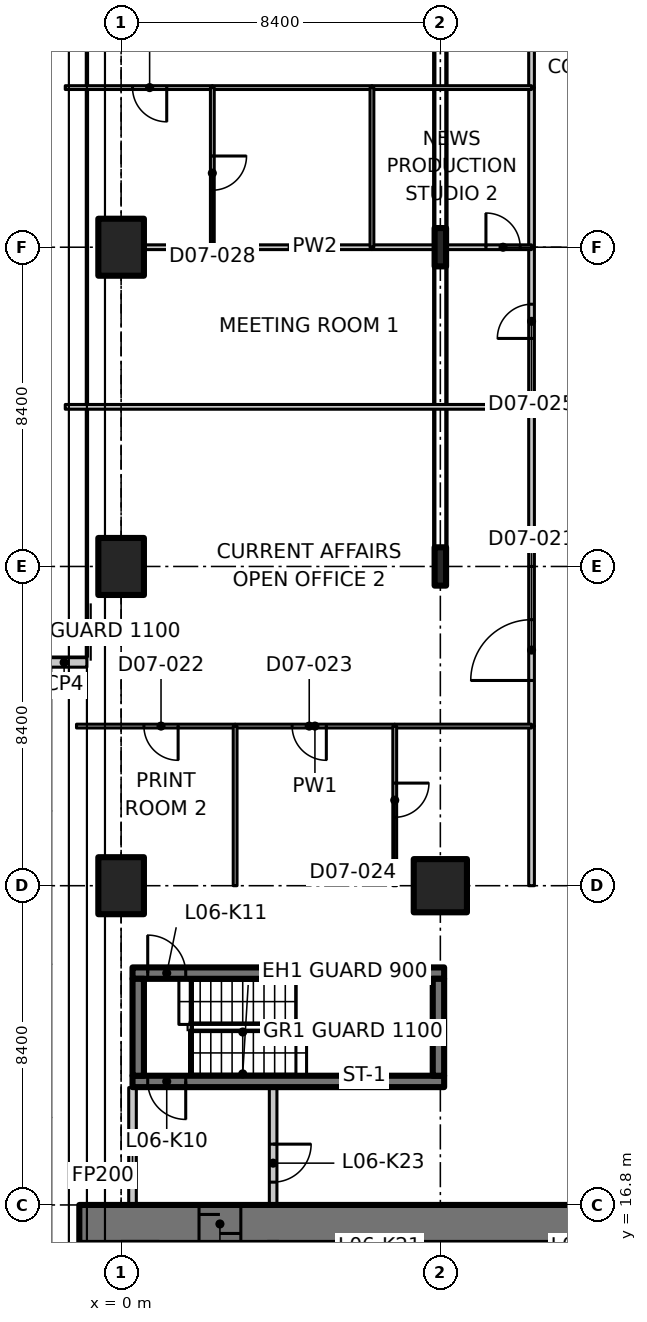
"""IFC4 building model, lengths in metres.
Left out: names, types, materials, properties, quantities, classifications, styles, units other than length and angle.
Written with IfcOpenShell. Run it as: python <this file> out.ifc"""

import sys

from ifc_helpers import new_model, si_unit, direction, frame, frame_2d, origin, origin_2d, place, context, subcontext, project, spatial, polyline, rectangle, i_section, outline, extrude, element, fill, save


model = new_model("IFC4")
c1 = context("Model", 3, precision=1e-05, world=origin(), true_north=direction((0.0, 1.0)))
c2 = subcontext(c1, "Body", "Model", "MODEL_VIEW")
j1 = project(units=[si_unit("LENGTHUNIT", "METRE"), si_unit("PLANEANGLEUNIT", "RADIAN")], contexts=[c1])
p1 = place(None, origin())
s1 = spatial("IfcSite", under=j1, at=p1, CompositionType="ELEMENT")
p2 = place(p1, origin())
s2 = spatial("IfcBuilding", under=s1, at=p2, CompositionType="ELEMENT")
p3 = place(p2, frame((0.0, 0.0, 36.5)))
s3 = spatial("IfcBuildingStorey", under=s2, at=p3, CompositionType="ELEMENT", Elevation=36.5)
for number, where, z_axis, x_axis in (
    (1, (0.0, 25.2, 0.0), (0.0, 0.0, 1.0), (1.0, 0.0, 0.0)),
    (2, (0.0, 33.6, 0.0), (0.0, 0.0, 1.0), (1.0, 0.0, 0.0)),
    (3, (0.0, 42.0, 0.0), (0.0, 0.0, 1.0), (1.0, 0.0, 0.0)),
):
    element("IfcColumn", number, at=place(p3, frame(where, z_axis=z_axis, x_axis=x_axis)), inside=s3, PredefinedType="COLUMN", context=c2, shape_type="SweptSolid", body=[
        extrude(rectangle(XDim=1.2, YDim=1.5, at=origin_2d()), origin(), (0.0, 0.0, 1.0), 3.35),
    ])
p4 = place(p3, frame((8.4, 25.2, 0.0), z_axis=(0.0, 0.0, 1.0), x_axis=(1.0, 0.0, 0.0)))
e4 = element("IfcColumn", 4, at=p4, inside=s3, PredefinedType="COLUMN", context=c2, shape_type="SweptSolid", body=[
    extrude(rectangle(XDim=1.4, YDim=1.4, at=origin_2d()), origin(), (0.0, 0.0, 1.0), 3.35),
])
for number, where, z_axis, x_axis in (
    (5, (8.4, 33.6, -0.25), (0.0, 0.0, 1.0), (1.0, 0.0, 0.0)),
    (6, (8.4, 42.0, -0.25), (0.0, 0.0, 1.0), (1.0, 0.0, 0.0)),
):
    element("IfcColumn", number, at=place(p3, frame(where, z_axis=z_axis, x_axis=x_axis)), inside=s3, PredefinedType="COLUMN", context=c2, shape_type="SweptSolid", body=[
        extrude(i_section(OverallWidth=0.302, OverallDepth=1.008, WebThickness=0.021, FlangeThickness=0.04, FilletRadius=0.03, at=origin_2d()), origin(), (0.0, 0.0, 1.0), 3.725),
    ])
p5 = place(p3, frame((-2.1, 31.075, 0.0), z_axis=(0.0, 0.0, 1.0), x_axis=(1.0, 0.0, 0.0)))
e7 = element("IfcWall", 7, at=p5, inside=s3, PredefinedType="PARAPET", context=c2, shape_type="SweptSolid", body=[
    extrude(rectangle(XDim=1.2, YDim=0.25, at=frame_2d((0.6, 0.0))), origin(), (0.0, 0.0, 1.0), 1.1),
])
p6 = place(p3, frame((-1.1, 16.3, 0.0), z_axis=(0.0, 0.0, 1.0), x_axis=(1.0, 0.0, 0.0)))
e8 = element("IfcWall", 8, at=p6, inside=s3, PredefinedType="SHEAR", context=c2, shape_type="SweptSolid", body=[
    extrude(rectangle(XDim=22.1, YDim=1.0, at=frame_2d((11.05, 0.0))), origin(), (0.0, 0.0, 1.0), 3.35),
])
p7 = place(p6, frame((3.15, 0.0, 0.0)))
e9 = element("IfcOpeningElement", 9, at=p7, cuts=e8, PredefinedType="OPENING", context=c2, shape_type="SweptSolid", body=[
    extrude(rectangle(XDim=1.1, YDim=2.3, at=frame_2d((0.55, 1.15))), frame((0.0, 0.51, 0.0), z_axis=(0.0, -1.0, 0.0), x_axis=(1.0, 0.0, 0.0)), (0.0, 0.0, 1.0), 1.02),
])
p8 = place(p3, frame((8.5, 20.05, 0.0), z_axis=(0.0, 0.0, 1.0), x_axis=(-1.0, 0.0, 0.0)))
e10 = element("IfcWall", 10, at=p8, inside=s3, PredefinedType="SHEAR", context=c2, shape_type="SweptSolid", body=[
    extrude(rectangle(XDim=8.2, YDim=0.3, at=frame_2d((4.1, 0.0))), origin(), (0.0, 0.0, 1.0), 3.35),
])
p9 = place(p8, frame((6.8, 0.0, 0.0)))
e11 = element("IfcOpeningElement", 11, at=p9, cuts=e10, PredefinedType="OPENING", context=c2, shape_type="SweptSolid", body=[
    extrude(rectangle(XDim=1.0, YDim=2.1, at=frame_2d((0.5, 1.05))), frame((0.0, 0.16, 0.0), z_axis=(0.0, -1.0, 0.0), x_axis=(1.0, 0.0, 0.0)), (0.0, 0.0, 1.0), 0.32),
])
p10 = place(p3, frame((0.3, 22.9, 0.0), z_axis=(0.0, 0.0, 1.0), x_axis=(1.0, 0.0, 0.0)))
e12 = element("IfcWall", 12, at=p10, inside=s3, PredefinedType="SHEAR", context=c2, shape_type="SweptSolid", body=[
    extrude(rectangle(XDim=8.2, YDim=0.3, at=frame_2d((4.1, 0.0))), origin(), (0.0, 0.0, 1.0), 3.35),
])
p11 = place(p10, frame((0.4, 0.0, 0.0)))
e13 = element("IfcOpeningElement", 13, at=p11, cuts=e12, PredefinedType="OPENING", context=c2, shape_type="SweptSolid", body=[
    extrude(rectangle(XDim=1.0, YDim=2.1, at=frame_2d((0.5, 1.05))), frame((0.0, 0.16, 0.0), z_axis=(0.0, -1.0, 0.0), x_axis=(1.0, 0.0, 0.0)), (0.0, 0.0, 1.0), 0.32),
])
for number, where, z_axis, x_axis in (
    (14, (0.45, 20.2, 0.0), (0.0, 0.0, 1.0), (0.0, 1.0, 0.0)),
    (15, (8.35, 20.2, 0.0), (0.0, 0.0, 1.0), (0.0, 1.0, 0.0)),
):
    element("IfcWall", number, at=place(p3, frame(where, z_axis=z_axis, x_axis=x_axis)), inside=s3, PredefinedType="SHEAR", context=c2, shape_type="SweptSolid", body=[
        extrude(rectangle(XDim=2.55, YDim=0.3, at=frame_2d((1.275, 0.0))), origin(), (0.0, 0.0, 1.0), 3.35),
    ])
p12 = place(p3, frame((0.3, 16.812, 0.0), z_axis=(0.0, 0.0, 1.0), x_axis=(0.0, 1.0, 0.0)))
e16 = element("IfcWall", 16, at=p12, inside=s3, PredefinedType="PARTITIONING", context=c2, shape_type="SweptSolid", body=[
    extrude(rectangle(XDim=3.076, YDim=0.2, at=frame_2d((1.538, 0.0))), origin(), (0.0, 0.0, 1.0), 2.98),
])
p13 = place(p3, frame((4.0, 19.888, 0.0), z_axis=(0.0, 0.0, 1.0), x_axis=(0.0, -1.0, 0.0)))
e17 = element("IfcWall", 17, at=p13, inside=s3, PredefinedType="PARTITIONING", context=c2, shape_type="SweptSolid", body=[
    extrude(rectangle(XDim=3.076, YDim=0.2, at=frame_2d((1.538, 0.0))), origin(), (0.0, 0.0, 1.0), 3.35),
])
p14 = place(p13, frame((1.488, 0.0, 0.0)))
e18 = element("IfcOpeningElement", 18, at=p14, cuts=e17, PredefinedType="OPENING", context=c2, shape_type="SweptSolid", body=[
    extrude(rectangle(XDim=1.0, YDim=2.1, at=frame_2d((0.5, 1.05))), frame((0.0, 0.11, 0.0), z_axis=(0.0, -1.0, 0.0), x_axis=(1.0, 0.0, 0.0)), (0.0, 0.0, 1.0), 0.22),
])
p15 = place(p3, frame((10.8, 29.4, 0.0), z_axis=(0.0, 0.0, 1.0), x_axis=(0.0, 1.0, 0.0)))
e19 = element("IfcWall", 19, at=p15, inside=s3, PredefinedType="PARTITIONING", context=c2, shape_type="SweptSolid", body=[
    extrude(rectangle(XDim=4.2, YDim=0.15, at=frame_2d((2.1, 0.0))), origin(), (0.0, 0.0, 1.0), 3.33),
])
p16 = place(p15, frame((1.2, 0.0, 0.0)))
e20 = element("IfcOpeningElement", 20, at=p16, cuts=e19, PredefinedType="OPENING", context=c2, shape_type="SweptSolid", body=[
    extrude(rectangle(XDim=1.6, YDim=2.1, at=frame_2d((0.8, 1.05))), frame((0.0, 0.085, 0.0), z_axis=(0.0, -1.0, 0.0), x_axis=(1.0, 0.0, 0.0)), (0.0, 0.0, 1.0), 0.17),
])
for number, where, z_axis, x_axis in (
    (21, (10.8, 25.2, 0.0), (0.0, 0.0, 1.0), (0.0, 1.0, 0.0)),
    (22, (10.8, 33.6, 0.0), (0.0, 0.0, 1.0), (0.0, 1.0, 0.0)),
):
    element("IfcWall", number, at=place(p3, frame(where, z_axis=z_axis, x_axis=x_axis)), inside=s3, PredefinedType="PARTITIONING", context=c2, shape_type="SweptSolid", body=[
        extrude(rectangle(XDim=4.2, YDim=0.15, at=frame_2d((2.1, 0.0))), origin(), (0.0, 0.0, 1.0), 3.33),
    ])
p17 = place(p3, frame((10.8, 37.8, 0.0), z_axis=(0.0, 0.0, 1.0), x_axis=(0.0, 1.0, 0.0)))
e23 = element("IfcWall", 23, at=p17, inside=s3, PredefinedType="PARTITIONING", context=c2, shape_type="SweptSolid", body=[
    extrude(rectangle(XDim=4.2, YDim=0.15, at=frame_2d((2.1, 0.0))), origin(), (0.0, 0.0, 1.0), 3.33),
])
p18 = place(p17, frame((1.8, 0.0, 0.0)))
e24 = element("IfcOpeningElement", 24, at=p18, cuts=e23, PredefinedType="OPENING", context=c2, shape_type="SweptSolid", body=[
    extrude(rectangle(XDim=0.9, YDim=2.1, at=frame_2d((0.45, 1.05))), frame((0.0, 0.085, 0.0), z_axis=(0.0, -1.0, 0.0), x_axis=(1.0, 0.0, 0.0)), (0.0, 0.0, 1.0), 0.17),
])
p19 = place(p3, frame((10.8, 46.2, 0.0), z_axis=(0.0, 0.0, 1.0), x_axis=(0.0, 1.0, 0.0)))
e25 = element("IfcWall", 25, at=p19, inside=s3, PredefinedType="PARTITIONING", context=c2, shape_type="SweptSolid", body=[
    extrude(rectangle(XDim=8.4, YDim=0.15, at=frame_2d((4.2, 0.0))), origin(), (0.0, 0.0, 1.0), 3.33),
])
p20 = place(p19, frame((3.6, 0.0, 0.0)))
e26 = element("IfcOpeningElement", 26, at=p20, cuts=e25, PredefinedType="OPENING", context=c2, shape_type="SweptSolid", body=[
    extrude(rectangle(XDim=1.6, YDim=2.1, at=frame_2d((0.8, 1.05))), frame((0.0, 0.085, 0.0), z_axis=(0.0, -1.0, 0.0), x_axis=(1.0, 0.0, 0.0)), (0.0, 0.0, 1.0), 0.17),
])
p21 = place(p3, frame((10.8, 42.0, 0.0), z_axis=(0.0, 0.0, 1.0), x_axis=(0.0, 1.0, 0.0)))
e27 = element("IfcWall", 27, at=p21, inside=s3, PredefinedType="PARTITIONING", context=c2, shape_type="SweptSolid", body=[
    extrude(rectangle(XDim=4.2, YDim=0.15, at=frame_2d((2.1, 0.0))), origin(), (0.0, 0.0, 1.0), 3.33),
])
p22 = place(p3, frame((3.0, 29.4, 0.0), z_axis=(0.0, 0.0, 1.0), x_axis=(-1.0, 0.0, 0.0)))
e28 = element("IfcWall", 28, at=p22, inside=s3, PredefinedType="PARTITIONING", context=c2, shape_type="SweptSolid", body=[
    extrude(rectangle(XDim=4.174, YDim=0.1, at=frame_2d((2.087, 0.0))), origin(), (0.0, 0.0, 1.0), 2.98),
])
p23 = place(p22, frame((1.5, 0.0, 0.0)))
e29 = element("IfcOpeningElement", 29, at=p23, cuts=e28, PredefinedType="OPENING", context=c2, shape_type="SweptSolid", body=[
    extrude(rectangle(XDim=0.9, YDim=2.1, at=frame_2d((0.45, 1.05))), frame((0.0, 0.06, 0.0), z_axis=(0.0, -1.0, 0.0), x_axis=(1.0, 0.0, 0.0)), (0.0, 0.0, 1.0), 0.12),
])
p24 = place(p3, frame((7.2, 29.4, 0.0), z_axis=(0.0, 0.0, 1.0), x_axis=(-1.0, 0.0, 0.0)))
e30 = element("IfcWall", 30, at=p24, inside=s3, PredefinedType="PARTITIONING", context=c2, shape_type="SweptSolid", body=[
    extrude(rectangle(XDim=4.2, YDim=0.1, at=frame_2d((2.1, 0.0))), origin(), (0.0, 0.0, 1.0), 3.33),
])
p25 = place(p24, frame((1.8, 0.0, 0.0)))
e31 = element("IfcOpeningElement", 31, at=p25, cuts=e30, PredefinedType="OPENING", context=c2, shape_type="SweptSolid", body=[
    extrude(rectangle(XDim=0.9, YDim=2.1, at=frame_2d((0.45, 1.05))), frame((0.0, 0.06, 0.0), z_axis=(0.0, -1.0, 0.0), x_axis=(1.0, 0.0, 0.0)), (0.0, 0.0, 1.0), 0.12),
])
p26 = place(p3, frame((10.8, 29.4, 0.0), z_axis=(0.0, 0.0, 1.0), x_axis=(-1.0, 0.0, 0.0)))
e32 = element("IfcWall", 32, at=p26, inside=s3, PredefinedType="PARTITIONING", context=c2, shape_type="SweptSolid", body=[
    extrude(rectangle(XDim=3.6, YDim=0.1, at=frame_2d((1.8, 0.0))), origin(), (0.0, 0.0, 1.0), 3.33),
])
p27 = place(p3, frame((-1.47, 37.8, 0.0), z_axis=(0.0, 0.0, 1.0), x_axis=(1.0, 0.0, 0.0)))
e33 = element("IfcWall", 33, at=p27, inside=s3, PredefinedType="PARTITIONING", context=c2, shape_type="SweptSolid", body=[
    extrude(outline(polyline([(0.0, 0.0), (12.27, 0.0), (12.27, 3.33), (1.92, 3.33), (1.918, 2.98), (1.022, 2.98), (1.02, 3.33), (0.37, 3.33), (0.0, 3.33), (0.0, 0.0)])), frame((0.0, 0.062, 0.0), z_axis=(0.0, -1.0, 0.0), x_axis=(1.0, 0.0, 0.0)), (0.0, 0.0, 1.0), 0.125),
])
p28 = place(p3, frame((3.0, 29.4, 0.0), z_axis=(0.0, 0.0, 1.0), x_axis=(0.0, -1.0, 0.0)))
e34 = element("IfcWall", 34, at=p28, inside=s3, PredefinedType="PARTITIONING", context=c2, shape_type="SweptSolid", body=[
    extrude(rectangle(XDim=4.2, YDim=0.1, at=frame_2d((2.1, 0.0))), origin(), (0.0, 0.0, 1.0), 3.33),
])
p29 = place(p3, frame((7.2, 29.4, 0.0), z_axis=(0.0, 0.0, 1.0), x_axis=(0.0, -1.0, 0.0)))
e35 = element("IfcWall", 35, at=p29, inside=s3, PredefinedType="PARTITIONING", context=c2, shape_type="SweptSolid", body=[
    extrude(rectangle(XDim=4.2, YDim=0.1, at=frame_2d((2.1, 0.0))), origin(), (0.0, 0.0, 1.0), 3.33),
])
p30 = place(p29, frame((1.5, 0.0, 0.0)))
e36 = element("IfcOpeningElement", 36, at=p30, cuts=e35, PredefinedType="OPENING", context=c2, shape_type="SweptSolid", body=[
    extrude(rectangle(XDim=0.9, YDim=2.1, at=frame_2d((0.45, 1.05))), frame((0.0, 0.06, 0.0), z_axis=(0.0, -1.0, 0.0), x_axis=(1.0, 0.0, 0.0)), (0.0, 0.0, 1.0), 0.12),
])
p31 = place(p3, frame((0.62, 42.0, 0.0), z_axis=(0.0, 0.0, 1.0), x_axis=(1.0, 0.0, 0.0)))
e37 = element("IfcWall", 37, at=p31, inside=s3, PredefinedType="PARTITIONING", context=c2, shape_type="SweptSolid", body=[
    extrude(rectangle(XDim=1.78, YDim=0.125, at=frame_2d((0.89, 0.0))), origin(), (0.0, 0.0, 1.0), 3.33),
])
p32 = place(p3, frame((2.4, 42.0, 0.0), z_axis=(0.0, 0.0, 1.0), x_axis=(1.0, 0.0, 0.0)))
e38 = element("IfcWall", 38, at=p32, inside=s3, PredefinedType="PARTITIONING", context=c2, shape_type="SweptSolid", body=[
    extrude(rectangle(XDim=4.2, YDim=0.125, at=frame_2d((2.1, 0.0))), origin(), (0.0, 0.0, 1.0), 3.33),
])
p33 = place(p3, frame((6.6, 42.0, 0.0), z_axis=(0.0, 0.0, 1.0), x_axis=(1.0, 0.0, 0.0)))
e39 = element("IfcWall", 39, at=p33, inside=s3, PredefinedType="PARTITIONING", context=c2, shape_type="SweptSolid", body=[
    extrude(rectangle(XDim=4.2, YDim=0.125, at=frame_2d((2.1, 0.0))), origin(), (0.0, 0.0, 1.0), 3.33),
])
p34 = place(p33, frame((3.0, 0.0, 0.0)))
e40 = element("IfcOpeningElement", 40, at=p34, cuts=e39, PredefinedType="OPENING", context=c2, shape_type="SweptSolid", body=[
    extrude(rectangle(XDim=0.9, YDim=2.1, at=frame_2d((0.45, 1.05))), frame((0.0, 0.073, 0.0), z_axis=(0.0, -1.0, 0.0), x_axis=(1.0, 0.0, 0.0)), (0.0, 0.0, 1.0), 0.145),
])
p35 = place(p3, frame((2.4, 46.2, 0.0), z_axis=(0.0, 0.0, 1.0), x_axis=(-1.0, 0.0, 0.0)))
e41 = element("IfcWall", 41, at=p35, inside=s3, PredefinedType="PARTITIONING", context=c2, shape_type="SweptSolid", body=[
    extrude(rectangle(XDim=3.87, YDim=0.1, at=frame_2d((1.935, 0.0))), origin(), (0.0, 0.0, 1.0), 2.98),
])
p36 = place(p35, frame((1.2, 0.0, 0.0)))
e42 = element("IfcOpeningElement", 42, at=p36, cuts=e41, PredefinedType="OPENING", context=c2, shape_type="SweptSolid", body=[
    extrude(rectangle(XDim=0.9, YDim=2.1, at=frame_2d((0.45, 1.05))), frame((0.0, 0.06, 0.0), z_axis=(0.0, -1.0, 0.0), x_axis=(1.0, 0.0, 0.0)), (0.0, 0.0, 1.0), 0.12),
])
p37 = place(p3, frame((6.6, 46.2, 0.0), z_axis=(0.0, 0.0, 1.0), x_axis=(-1.0, 0.0, 0.0)))
e43 = element("IfcWall", 43, at=p37, inside=s3, PredefinedType="PARTITIONING", context=c2, shape_type="SweptSolid", body=[
    extrude(rectangle(XDim=4.2, YDim=0.1, at=frame_2d((2.1, 0.0))), origin(), (0.0, 0.0, 1.0), 3.33),
])
p38 = place(p3, frame((10.8, 46.2, 0.0), z_axis=(0.0, 0.0, 1.0), x_axis=(-1.0, 0.0, 0.0)))
e44 = element("IfcWall", 44, at=p38, inside=s3, PredefinedType="PARTITIONING", context=c2, shape_type="SweptSolid", body=[
    extrude(rectangle(XDim=4.2, YDim=0.1, at=frame_2d((2.1, 0.0))), origin(), (0.0, 0.0, 1.0), 3.33),
])
p39 = place(p3, frame((2.4, 46.2, 0.0), z_axis=(0.0, 0.0, 1.0), x_axis=(0.0, -1.0, 0.0)))
e45 = element("IfcWall", 45, at=p39, inside=s3, PredefinedType="PARTITIONING", context=c2, shape_type="SweptSolid", body=[
    extrude(rectangle(XDim=4.2, YDim=0.1, at=frame_2d((2.1, 0.0))), origin(), (0.0, 0.0, 1.0), 3.33),
])
p40 = place(p39, frame((1.8, 0.0, 0.0)))
e46 = element("IfcOpeningElement", 46, at=p40, cuts=e45, PredefinedType="OPENING", context=c2, shape_type="SweptSolid", body=[
    extrude(rectangle(XDim=0.9, YDim=2.1, at=frame_2d((0.45, 1.05))), frame((0.0, 0.06, 0.0), z_axis=(0.0, -1.0, 0.0), x_axis=(1.0, 0.0, 0.0)), (0.0, 0.0, 1.0), 0.12),
])
p41 = place(p3, frame((6.6, 46.2, 0.0), z_axis=(0.0, 0.0, 1.0), x_axis=(0.0, -1.0, 0.0)))
e47 = element("IfcWall", 47, at=p41, inside=s3, PredefinedType="PARTITIONING", context=c2, shape_type="SweptSolid", body=[
    extrude(rectangle(XDim=4.2, YDim=0.1, at=frame_2d((2.1, 0.0))), origin(), (0.0, 0.0, 1.0), 3.33),
])
p42 = place(p7, origin())
e48 = element("IfcDoor", 48, at=p42, inside=s3, OperationType="SLIDING_TO_LEFT", PredefinedType="DOOR", context=c2, shape_type="SweptSolid", body=[
    extrude(rectangle(XDim=1.1, YDim=2.3, at=frame_2d((0.55, 1.15))), frame((0.0, 0.025, 0.0), z_axis=(0.0, -1.0, 0.0), x_axis=(1.0, 0.0, 0.0)), (0.0, 0.0, 1.0), 0.05),
])
fill(e9, e48)
p43 = place(p9, origin())
e49 = element("IfcDoor", 49, at=p43, inside=s3, OperationType="SINGLE_SWING_RIGHT", PredefinedType="DOOR", context=c2, shape_type="SweptSolid", body=[
    extrude(rectangle(XDim=1.0, YDim=2.1, at=frame_2d((0.5, 1.05))), frame((0.0, 0.025, 0.0), z_axis=(0.0, -1.0, 0.0), x_axis=(1.0, 0.0, 0.0)), (0.0, 0.0, 1.0), 0.05),
])
fill(e11, e49)
p44 = place(p11, origin())
e50 = element("IfcDoor", 50, at=p44, inside=s3, OperationType="SINGLE_SWING_LEFT", PredefinedType="DOOR", context=c2, shape_type="SweptSolid", body=[
    extrude(rectangle(XDim=1.0, YDim=2.1, at=frame_2d((0.5, 1.05))), frame((0.0, 0.025, 0.0), z_axis=(0.0, -1.0, 0.0), x_axis=(1.0, 0.0, 0.0)), (0.0, 0.0, 1.0), 0.05),
])
fill(e13, e50)
p45 = place(p14, origin())
e51 = element("IfcDoor", 51, at=p45, inside=s3, OperationType="SINGLE_SWING_LEFT", PredefinedType="DOOR", context=c2, shape_type="SweptSolid", body=[
    extrude(rectangle(XDim=1.0, YDim=2.1, at=frame_2d((0.5, 1.05))), frame((0.0, 0.025, 0.0), z_axis=(0.0, -1.0, 0.0), x_axis=(1.0, 0.0, 0.0)), (0.0, 0.0, 1.0), 0.05),
])
fill(e18, e51)
p46 = place(p16, origin())
e52 = element("IfcDoor", 52, at=p46, inside=s3, OperationType="DOUBLE_DOOR_SINGLE_SWING", PredefinedType="DOOR", context=c2, shape_type="SweptSolid", body=[
    extrude(rectangle(XDim=1.6, YDim=2.1, at=frame_2d((0.8, 1.05))), frame((0.0, 0.025, 0.0), z_axis=(0.0, -1.0, 0.0), x_axis=(1.0, 0.0, 0.0)), (0.0, 0.0, 1.0), 0.05),
])
fill(e20, e52)
p47 = place(p23, origin())
e53 = element("IfcDoor", 53, at=p47, inside=s3, OperationType="SINGLE_SWING_LEFT", PredefinedType="DOOR", context=c2, shape_type="SweptSolid", body=[
    extrude(rectangle(XDim=0.9, YDim=2.1, at=frame_2d((0.45, 1.05))), frame((0.0, 0.025, 0.0), z_axis=(0.0, -1.0, 0.0), x_axis=(1.0, 0.0, 0.0)), (0.0, 0.0, 1.0), 0.05),
])
fill(e29, e53)
p48 = place(p25, origin())
e54 = element("IfcDoor", 54, at=p48, inside=s3, OperationType="SINGLE_SWING_LEFT", PredefinedType="DOOR", context=c2, shape_type="SweptSolid", body=[
    extrude(rectangle(XDim=0.9, YDim=2.1, at=frame_2d((0.45, 1.05))), frame((0.0, 0.025, 0.0), z_axis=(0.0, -1.0, 0.0), x_axis=(1.0, 0.0, 0.0)), (0.0, 0.0, 1.0), 0.05),
])
fill(e31, e54)
p49 = place(p30, origin())
e55 = element("IfcDoor", 55, at=p49, inside=s3, OperationType="SINGLE_SWING_LEFT", PredefinedType="DOOR", context=c2, shape_type="SweptSolid", body=[
    extrude(rectangle(XDim=0.9, YDim=2.1, at=frame_2d((0.45, 1.05))), frame((0.0, 0.025, 0.0), z_axis=(0.0, -1.0, 0.0), x_axis=(1.0, 0.0, 0.0)), (0.0, 0.0, 1.0), 0.05),
])
fill(e36, e55)
p50 = place(p18, origin())
e56 = element("IfcDoor", 56, at=p50, inside=s3, OperationType="SINGLE_SWING_LEFT", PredefinedType="DOOR", context=c2, shape_type="SweptSolid", body=[
    extrude(rectangle(XDim=0.9, YDim=2.1, at=frame_2d((0.45, 1.05))), frame((0.0, 0.025, 0.0), z_axis=(0.0, -1.0, 0.0), x_axis=(1.0, 0.0, 0.0)), (0.0, 0.0, 1.0), 0.05),
])
fill(e24, e56)
p51 = place(p36, origin())
e57 = element("IfcDoor", 57, at=p51, inside=s3, OperationType="SINGLE_SWING_LEFT", PredefinedType="DOOR", context=c2, shape_type="SweptSolid", body=[
    extrude(rectangle(XDim=0.9, YDim=2.1, at=frame_2d((0.45, 1.05))), frame((0.0, 0.025, 0.0), z_axis=(0.0, -1.0, 0.0), x_axis=(1.0, 0.0, 0.0)), (0.0, 0.0, 1.0), 0.05),
])
fill(e42, e57)
p52 = place(p40, origin())
e58 = element("IfcDoor", 58, at=p52, inside=s3, OperationType="SINGLE_SWING_LEFT", PredefinedType="DOOR", context=c2, shape_type="SweptSolid", body=[
    extrude(rectangle(XDim=0.9, YDim=2.1, at=frame_2d((0.45, 1.05))), frame((0.0, 0.025, 0.0), z_axis=(0.0, -1.0, 0.0), x_axis=(1.0, 0.0, 0.0)), (0.0, 0.0, 1.0), 0.05),
])
fill(e46, e58)
p53 = place(p34, origin())
e59 = element("IfcDoor", 59, at=p53, inside=s3, OperationType="SINGLE_SWING_RIGHT", PredefinedType="DOOR", context=c2, shape_type="SweptSolid", body=[
    extrude(rectangle(XDim=0.9, YDim=2.1, at=frame_2d((0.45, 1.05))), frame((0.0, 0.025, 0.0), z_axis=(0.0, -1.0, 0.0), x_axis=(1.0, 0.0, 0.0)), (0.0, 0.0, 1.0), 0.05),
])
fill(e40, e59)
save(model, sys.argv[1])
